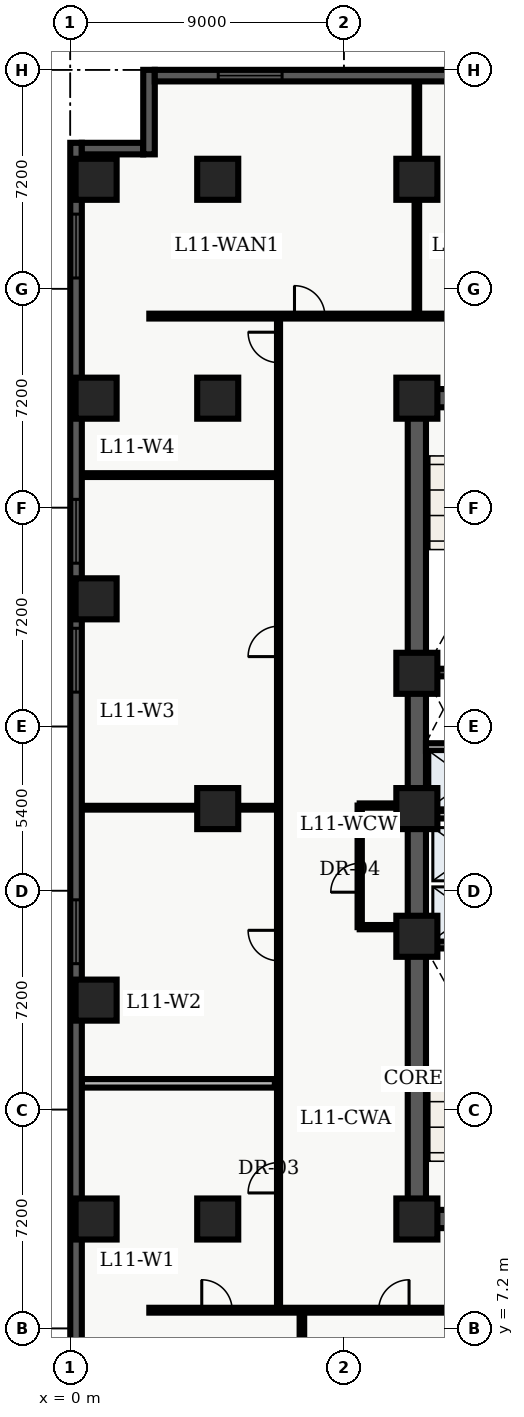
"""IFC4 building model, lengths in metres.
Left out: names, types, materials, properties, quantities, classifications, styles, units other than length and angle.
Written with IfcOpenShell. Run it as: python <this file> out.ifc"""

import sys

from ifc_helpers import new_model, entity, si_unit, converted_unit, direction, frame, origin_with_axes, origin_2d_with_axis, place, context, subcontext, project, spatial, polyline, rectangle, outline, extrude, element, fill, save


model = new_model("IFC4")
c1 = context("Model", 3, precision=1e-05, world=origin_with_axes(), true_north=direction((0.0, 1.0)))
c2 = subcontext(c1, "Body", "Model", "MODEL_VIEW")
j1 = project(units=[si_unit("LENGTHUNIT", "METRE"), converted_unit("PLANEANGLEUNIT", "DEGREE", entity("IfcPlaneAngleMeasure", 0.017), si_unit("PLANEANGLEUNIT", "RADIAN"), dimensions=[0, 0, 0, 0, 0, 0, 0])], contexts=[c1])
p1 = place(None, origin_with_axes())
s1 = spatial("IfcSite", under=j1, at=p1, CompositionType="ELEMENT")
p2 = place(p1, origin_with_axes())
s2 = spatial("IfcBuilding", under=s1, at=p2, CompositionType="ELEMENT")
p3 = place(p2, frame((0.0, 0.0, 48.3), z_axis=(0.0, 0.0, 1.0), x_axis=(1.0, 0.0, 0.0)))
s3 = spatial("IfcBuildingStorey", under=s2, at=p3, CompositionType="ELEMENT", Elevation=48.3)
p4 = place(p3, frame((11.4, 10.8, 0.0), z_axis=(0.0, 0.0, 1.0), x_axis=(0.0, 1.0, 0.0)))
e1 = element("IfcWall", 1, at=p4, inside=s3, PredefinedType="SHEAR", context=c2, shape_type="SweptSolid", body=[
    extrude(outline(polyline([(0.0, -0.3), (27.0, -0.3), (27.0, 0.3), (0.0, 0.3), (0.0, -0.3)])), origin_with_axes(), (0.0, 0.0, 1.0), 3.66),
])
p5 = place(p3, frame((11.4, 10.8, 0.0), z_axis=(0.0, 0.0, 1.0), x_axis=(1.0, 0.0, 0.0)))
e2 = element("IfcWall", 2, at=p5, inside=s3, PredefinedType="SHEAR", context=c2, shape_type="SweptSolid", body=[
    extrude(outline(polyline([(0.0, -0.3), (7.2, -0.3), (7.2, 0.3), (0.0, 0.3), (0.0, -0.3)])), origin_with_axes(), (0.0, 0.0, 1.0), 3.66),
])
p6 = place(p5, frame((2.625, 0.0, 0.0), z_axis=(0.0, 0.0, 1.0), x_axis=(1.0, 0.0, 0.0)))
e3 = element("IfcOpeningElement", 3, at=p6, cuts=e2, PredefinedType="OPENING", context=c2, shape_type="SweptSolid", body=[
    extrude(rectangle(XDim=1.05, YDim=0.62, at=origin_2d_with_axis()), origin_with_axes(), (0.0, 0.0, 1.0), 2.15),
])
p7 = place(p3, frame((11.4, 37.8, 0.0), z_axis=(0.0, 0.0, 1.0), x_axis=(1.0, 0.0, 0.0)))
e4 = element("IfcWall", 4, at=p7, inside=s3, PredefinedType="SHEAR", context=c2, shape_type="SweptSolid", body=[
    extrude(outline(polyline([(0.0, -0.3), (7.2, -0.3), (7.2, 0.3), (0.0, 0.3), (0.0, -0.3)])), origin_with_axes(), (0.0, 0.0, 1.0), 3.66),
])
p8 = place(p7, frame((2.625, 0.0, 0.0), z_axis=(0.0, 0.0, 1.0), x_axis=(1.0, 0.0, 0.0)))
e5 = element("IfcOpeningElement", 5, at=p8, cuts=e4, PredefinedType="OPENING", context=c2, shape_type="SweptSolid", body=[
    extrude(rectangle(XDim=1.05, YDim=0.62, at=origin_2d_with_axis()), origin_with_axes(), (0.0, 0.0, 1.0), 2.15),
])
for number, where, z_axis, x_axis in (
    (6, (11.7, 19.825, 0.0), (0.0, 0.0, 1.0), (1.0, 0.0, 0.0)),
    (7, (11.7, 28.775, 0.0), (0.0, 0.0, 1.0), (1.0, 0.0, 0.0)),
):
    element("IfcWall", number, at=place(p3, frame(where, z_axis=z_axis, x_axis=x_axis)), inside=s3, PredefinedType="SHEAR", context=c2, shape_type="SweptSolid", body=[
        extrude(outline(polyline([(0.0, -0.125), (6.6, -0.125), (6.6, 0.125), (0.0, 0.125), (0.0, -0.125)])), origin_with_axes(), (0.0, 0.0, 1.0), 3.66),
    ])
p9 = place(p3, frame((11.7, 24.1, 0.0), z_axis=(0.0, 0.0, 1.0), x_axis=(1.0, 0.0, 0.0)))
e8 = element("IfcWall", 8, at=p9, inside=s3, PredefinedType="SOLIDWALL", context=c2, shape_type="SweptSolid", body=[
    extrude(outline(polyline([(0.0, -0.125), (6.6, -0.125), (6.6, 0.125), (0.0, 0.125), (0.0, -0.125)])), origin_with_axes(), (0.0, 0.0, 1.0), 2.7),
])
p10 = place(p9, frame((3.6, 0.0, 0.0), z_axis=(0.0, 0.0, 1.0), x_axis=(1.0, 0.0, 0.0)))
e9 = element("IfcOpeningElement", 9, at=p10, cuts=e8, PredefinedType="OPENING", context=c2, shape_type="SweptSolid", body=[
    extrude(rectangle(XDim=0.9, YDim=0.27, at=origin_2d_with_axis()), origin_with_axes(), (0.0, 0.0, 1.0), 2.15),
])
p11 = place(p9, frame((5.65, 0.0, 0.0), z_axis=(0.0, 0.0, 1.0), x_axis=(1.0, 0.0, 0.0)))
e10 = element("IfcOpeningElement", 10, at=p11, cuts=e8, PredefinedType="OPENING", context=c2, shape_type="SweptSolid", body=[
    extrude(rectangle(XDim=0.9, YDim=0.27, at=origin_2d_with_axis()), origin_with_axes(), (0.0, 0.0, 1.0), 2.15),
])
p12 = place(p3, frame((11.7, 26.325, 0.0), z_axis=(0.0, 0.0, 1.0), x_axis=(1.0, 0.0, 0.0)))
e11 = element("IfcWall", 11, at=p12, inside=s3, PredefinedType="SOLIDWALL", context=c2, shape_type="SweptSolid", body=[
    extrude(outline(polyline([(0.0, -0.125), (6.6, -0.125), (6.6, 0.125), (0.0, 0.125), (0.0, -0.125)])), origin_with_axes(), (0.0, 0.0, 1.0), 2.7),
])
p13 = place(p12, frame((3.5, 0.0, 0.0), z_axis=(0.0, 0.0, 1.0), x_axis=(1.0, 0.0, 0.0)))
e12 = element("IfcOpeningElement", 12, at=p13, cuts=e11, PredefinedType="OPENING", context=c2, shape_type="SweptSolid", body=[
    extrude(rectangle(XDim=0.9, YDim=0.27, at=origin_2d_with_axis()), origin_with_axes(), (0.0, 0.0, 1.0), 2.15),
])
for number, where, z_axis, x_axis in (
    (13, (11.4, 10.8, 0.0), (0.0, 0.0, 1.0), (1.0, 0.0, 0.0)),
    (14, (11.4, 20.1, 0.0), (0.0, 0.0, 1.0), (1.0, 0.0, 0.0)),
    (15, (11.4, 24.3, 0.0), (0.0, 0.0, 1.0), (1.0, 0.0, 0.0)),
    (16, (11.4, 28.75, 0.0), (0.0, 0.0, 1.0), (1.0, 0.0, 0.0)),
    (17, (11.4, 37.8, 0.0), (0.0, 0.0, 1.0), (1.0, 0.0, 0.0)),
    (18, (11.4, 45.0, 0.0), (0.0, 0.0, 1.0), (1.0, 0.0, 0.0)),
    (19, (4.85, 10.8, 0.0), (0.0, 0.0, 1.0), (1.0, 0.0, 0.0)),
    (20, (4.85, 24.3, 0.0), (0.0, 0.0, 1.0), (1.0, 0.0, 0.0)),
    (21, (4.85, 37.8, 0.0), (0.0, 0.0, 1.0), (1.0, 0.0, 0.0)),
    (22, (4.85, 45.0, 0.0), (0.0, 0.0, 1.0), (1.0, 0.0, 0.0)),
    (23, (0.85, 10.8, 0.0), (0.0, 0.0, 1.0), (1.0, 0.0, 0.0)),
    (24, (0.85, 18.0, 0.0), (0.0, 0.0, 1.0), (1.0, 0.0, 0.0)),
    (25, (0.85, 31.2, 0.0), (0.0, 0.0, 1.0), (1.0, 0.0, 0.0)),
    (26, (0.85, 37.8, 0.0), (0.0, 0.0, 1.0), (1.0, 0.0, 0.0)),
    (27, (0.85, 45.0, 0.0), (0.0, 0.0, 1.0), (1.0, 0.0, 0.0)),
):
    element("IfcColumn", number, at=place(p3, frame(where, z_axis=z_axis, x_axis=x_axis)), inside=s3, PredefinedType="COLUMN", context=c2, shape_type="SweptSolid", body=[
        extrude(rectangle(XDim=1.35, YDim=1.35, at=origin_2d_with_axis()), origin_with_axes(), (0.0, 0.0, 1.0), 3.9),
    ])
p14 = place(p3, frame((9.52, 20.4, 0.0), z_axis=(0.0, 0.0, 1.0), x_axis=(0.0, 1.0, 0.0)))
e28 = element("IfcWall", 28, at=p14, inside=s3, PredefinedType="PARTITIONING", context=c2, shape_type="SweptSolid", body=[
    extrude(outline(polyline([(0.0, -0.07), (4.0, -0.07), (4.0, 0.07), (0.0, 0.07), (0.0, -0.07)])), origin_with_axes(), (0.0, 0.0, 1.0), 2.7),
])
p15 = place(p14, frame((1.625, 0.0, 0.0), z_axis=(0.0, 0.0, 1.0), x_axis=(1.0, 0.0, 0.0)))
e29 = element("IfcOpeningElement", 29, at=p15, cuts=e28, PredefinedType="OPENING", context=c2, shape_type="SweptSolid", body=[
    extrude(rectangle(XDim=0.95, YDim=0.16, at=origin_2d_with_axis()), origin_with_axes(), (0.0, 0.0, 1.0), 2.15),
])
for number, where, z_axis, x_axis in (
    (30, (9.52, 20.4, 0.0), (0.0, 0.0, 1.0), (1.0, 0.0, 0.0)),
    (31, (9.52, 24.4, 0.0), (0.0, 0.0, 1.0), (1.0, 0.0, 0.0)),
):
    element("IfcWall", number, at=place(p3, frame(where, z_axis=z_axis, x_axis=x_axis)), inside=s3, PredefinedType="PARTITIONING", context=c2, shape_type="SweptSolid", body=[
        extrude(outline(polyline([(0.0, -0.07), (1.58, -0.07), (1.58, 0.07), (0.0, 0.07), (0.0, -0.07)])), origin_with_axes(), (0.0, 0.0, 1.0), 2.7),
    ])
p16 = place(p3, frame((2.6, 7.8, 0.0), z_axis=(0.0, 0.0, 1.0), x_axis=(1.0, 0.0, 0.0)))
e32 = element("IfcWall", 32, at=p16, inside=s3, PredefinedType="PARTITIONING", context=c2, shape_type="SweptSolid", body=[
    extrude(outline(polyline([(0.0, -0.08), (18.55, -0.08), (18.55, 0.08), (0.0, 0.08), (0.0, -0.08)])), origin_with_axes(), (0.0, 0.0, 1.0), 2.7),
])
p17 = place(p16, frame((2.225, 0.0, 0.0), z_axis=(0.0, 0.0, 1.0), x_axis=(1.0, 0.0, 0.0)))
e33 = element("IfcOpeningElement", 33, at=p17, cuts=e32, PredefinedType="OPENING", context=c2, shape_type="SweptSolid", body=[
    extrude(rectangle(XDim=1.0, YDim=0.18, at=origin_2d_with_axis()), origin_with_axes(), (0.0, 0.0, 1.0), 2.15),
])
p18 = place(p16, frame((8.043, 0.0, 0.0), z_axis=(0.0, 0.0, 1.0), x_axis=(1.0, 0.0, 0.0)))
e34 = element("IfcOpeningElement", 34, at=p18, cuts=e32, PredefinedType="OPENING", context=c2, shape_type="SweptSolid", body=[
    extrude(rectangle(XDim=1.0, YDim=0.18, at=origin_2d_with_axis()), origin_with_axes(), (0.0, 0.0, 1.0), 2.15),
])
p19 = place(p16, frame((14.784, 0.0, 0.0), z_axis=(0.0, 0.0, 1.0), x_axis=(1.0, 0.0, 0.0)))
e35 = element("IfcOpeningElement", 35, at=p19, cuts=e32, PredefinedType="OPENING", context=c2, shape_type="SweptSolid", body=[
    extrude(rectangle(XDim=1.0, YDim=0.18, at=origin_2d_with_axis()), origin_with_axes(), (0.0, 0.0, 1.0), 2.15),
])
p20 = place(p3, frame((2.6, 40.5, 0.0), z_axis=(0.0, 0.0, 1.0), x_axis=(1.0, 0.0, 0.0)))
e36 = element("IfcWall", 36, at=p20, inside=s3, PredefinedType="PARTITIONING", context=c2, shape_type="SweptSolid", body=[
    extrude(outline(polyline([(0.0, -0.08), (18.65, -0.08), (18.65, 0.08), (0.0, 0.08), (0.0, -0.08)])), origin_with_axes(), (0.0, 0.0, 1.0), 2.7),
])
p21 = place(p20, frame((5.275, 0.0, 0.0), z_axis=(0.0, 0.0, 1.0), x_axis=(1.0, 0.0, 0.0)))
e37 = element("IfcOpeningElement", 37, at=p21, cuts=e36, PredefinedType="OPENING", context=c2, shape_type="SweptSolid", body=[
    extrude(rectangle(XDim=1.0, YDim=0.18, at=origin_2d_with_axis()), origin_with_axes(), (0.0, 0.0, 1.0), 2.15),
])
p22 = place(p20, frame((12.61, 0.0, 0.0), z_axis=(0.0, 0.0, 1.0), x_axis=(1.0, 0.0, 0.0)))
e38 = element("IfcOpeningElement", 38, at=p22, cuts=e36, PredefinedType="OPENING", context=c2, shape_type="SweptSolid", body=[
    extrude(rectangle(XDim=1.2, YDim=0.18, at=origin_2d_with_axis()), origin_with_axes(), (0.0, 0.0, 1.0), 2.2),
])
p23 = place(p3, frame((6.85, 7.8, 0.0), z_axis=(0.0, 0.0, 1.0), x_axis=(0.0, 1.0, 0.0)))
e39 = element("IfcWall", 39, at=p23, inside=s3, PredefinedType="PARTITIONING", context=c2, shape_type="SweptSolid", body=[
    extrude(outline(polyline([(0.0, -0.05), (32.7, -0.05), (32.7, 0.05), (0.0, 0.05), (0.0, -0.05)])), origin_with_axes(), (0.0, 0.0, 1.0), 2.7),
])
p24 = place(p23, frame((4.357, 0.0, 0.0), z_axis=(0.0, 0.0, 1.0), x_axis=(1.0, 0.0, 0.0)))
e40 = element("IfcOpeningElement", 40, at=p24, cuts=e39, PredefinedType="OPENING", context=c2, shape_type="SweptSolid", body=[
    extrude(rectangle(XDim=1.0, YDim=0.12, at=origin_2d_with_axis()), origin_with_axes(), (0.0, 0.0, 1.0), 2.15),
])
p25 = place(p23, frame((11.996, 0.0, 0.0), z_axis=(0.0, 0.0, 1.0), x_axis=(1.0, 0.0, 0.0)))
e41 = element("IfcOpeningElement", 41, at=p25, cuts=e39, PredefinedType="OPENING", context=c2, shape_type="SweptSolid", body=[
    extrude(rectangle(XDim=1.0, YDim=0.12, at=origin_2d_with_axis()), origin_with_axes(), (0.0, 0.0, 1.0), 2.15),
])
p26 = place(p23, frame((22.0, 0.0, 0.0), z_axis=(0.0, 0.0, 1.0), x_axis=(1.0, 0.0, 0.0)))
e42 = element("IfcOpeningElement", 42, at=p26, cuts=e39, PredefinedType="OPENING", context=c2, shape_type="SweptSolid", body=[
    extrude(rectangle(XDim=1.0, YDim=0.12, at=origin_2d_with_axis()), origin_with_axes(), (0.0, 0.0, 1.0), 2.15),
])
p27 = place(p23, frame((31.67, 0.0, 0.0), z_axis=(0.0, 0.0, 1.0), x_axis=(1.0, 0.0, 0.0)))
e43 = element("IfcOpeningElement", 43, at=p27, cuts=e39, PredefinedType="OPENING", context=c2, shape_type="SweptSolid", body=[
    extrude(rectangle(XDim=1.0, YDim=0.12, at=origin_2d_with_axis()), origin_with_axes(), (0.0, 0.0, 1.0), 2.15),
])
p28 = place(p3, frame((0.375, 15.263, 0.0), z_axis=(0.0, 0.0, 1.0), x_axis=(1.0, 0.0, 0.0)))
e44 = element("IfcWall", 44, at=p28, inside=s3, PredefinedType="PARTITIONING", context=c2, shape_type="SweptSolid", body=[
    extrude(outline(polyline([(0.0, -0.14), (6.355, -0.14), (6.355, 0.14), (0.0, 0.14), (0.0, -0.14)])), origin_with_axes(), (0.0, 0.0, 1.0), 2.7),
])
for number, where, z_axis, x_axis in (
    (45, (0.375, 24.329, 0.0), (0.0, 0.0, 1.0), (1.0, 0.0, 0.0)),
    (46, (0.375, 35.27, 0.0), (0.0, 0.0, 1.0), (1.0, 0.0, 0.0)),
):
    element("IfcWall", number, at=place(p3, frame(where, z_axis=z_axis, x_axis=x_axis)), inside=s3, PredefinedType="PARTITIONING", context=c2, shape_type="SweptSolid", body=[
        extrude(outline(polyline([(0.0, -0.062), (6.355, -0.062), (6.355, 0.062), (0.0, 0.062), (0.0, -0.062)])), origin_with_axes(), (0.0, 0.0, 1.0), 2.7),
    ])
p29 = place(p3, frame((7.619, 0.36, 0.0), z_axis=(0.0, 0.0, 1.0), x_axis=(0.0, 1.0, 0.0)))
e47 = element("IfcWall", 47, at=p29, inside=s3, PredefinedType="PARTITIONING", context=c2, shape_type="SweptSolid", body=[
    extrude(outline(polyline([(0.0, -0.075), (7.34, -0.075), (7.34, 0.075), (0.0, 0.075), (0.0, -0.075)])), origin_with_axes(), (0.0, 0.0, 1.0), 2.7),
])
p30 = place(p3, frame((11.4, 40.6, 0.0), z_axis=(0.0, 0.0, 1.0), x_axis=(0.0, 1.0, 0.0)))
e48 = element("IfcWall", 48, at=p30, inside=s3, PredefinedType="PARTITIONING", context=c2, shape_type="SweptSolid", body=[
    extrude(outline(polyline([(0.0, -0.075), (7.64, -0.075), (7.64, 0.075), (0.0, 0.075), (0.0, -0.075)])), origin_with_axes(), (0.0, 0.0, 1.0), 2.7),
])
p31 = place(p3, frame((0.19, 2.78, 0.0), z_axis=(0.0, 0.0, 1.0), x_axis=(0.0, 1.0, 0.0)))
e49 = element("IfcWall", 49, at=p31, inside=s3, PredefinedType="SOLIDWALL", context=c2, shape_type="SweptSolid", body=[
    extrude(outline(polyline([(0.0, -0.19), (43.42, -0.19), (43.42, 0.19), (0.0, 0.19), (0.0, -0.19)])), origin_with_axes(), (0.0, 0.0, 1.0), 3.66),
])
p32 = place(p31, frame((2.946, 0.0, 0.45), z_axis=(0.0, 0.0, 1.0), x_axis=(1.0, 0.0, 0.0)))
e50 = element("IfcOpeningElement", 50, at=p32, cuts=e49, PredefinedType="OPENING", context=c2, shape_type="SweptSolid", body=[
    extrude(rectangle(XDim=2.1, YDim=0.4, at=origin_2d_with_axis()), origin_with_axes(), (0.0, 0.0, 1.0), 2.2),
])
p33 = place(p31, frame((17.469, 0.0, 0.45), z_axis=(0.0, 0.0, 1.0), x_axis=(1.0, 0.0, 0.0)))
e51 = element("IfcOpeningElement", 51, at=p33, cuts=e49, PredefinedType="OPENING", context=c2, shape_type="SweptSolid", body=[
    extrude(rectangle(XDim=2.1, YDim=0.4, at=origin_2d_with_axis()), origin_with_axes(), (0.0, 0.0, 1.0), 2.2),
])
p34 = place(p31, frame((26.401, 0.0, 0.45), z_axis=(0.0, 0.0, 1.0), x_axis=(1.0, 0.0, 0.0)))
e52 = element("IfcOpeningElement", 52, at=p34, cuts=e49, PredefinedType="OPENING", context=c2, shape_type="SweptSolid", body=[
    extrude(rectangle(XDim=2.1, YDim=0.4, at=origin_2d_with_axis()), origin_with_axes(), (0.0, 0.0, 1.0), 2.2),
])
p35 = place(p31, frame((30.642, 0.0, 0.45), z_axis=(0.0, 0.0, 1.0), x_axis=(1.0, 0.0, 0.0)))
e53 = element("IfcOpeningElement", 53, at=p35, cuts=e49, PredefinedType="OPENING", context=c2, shape_type="SweptSolid", body=[
    extrude(rectangle(XDim=2.1, YDim=0.4, at=origin_2d_with_axis()), origin_with_axes(), (0.0, 0.0, 1.0), 2.2),
])
p36 = place(p31, frame((40.024, 0.0, 0.45), z_axis=(0.0, 0.0, 1.0), x_axis=(1.0, 0.0, 0.0)))
e54 = element("IfcOpeningElement", 54, at=p36, cuts=e49, PredefinedType="OPENING", context=c2, shape_type="SweptSolid", body=[
    extrude(rectangle(XDim=2.1, YDim=0.4, at=origin_2d_with_axis()), origin_with_axes(), (0.0, 0.0, 1.0), 2.2),
])
p37 = place(p3, frame((0.38, 46.01, 0.0), z_axis=(0.0, 0.0, 1.0), x_axis=(1.0, 0.0, 0.0)))
e55 = element("IfcWall", 55, at=p37, inside=s3, PredefinedType="SOLIDWALL", context=c2, shape_type="SweptSolid", body=[
    extrude(outline(polyline([(0.0, -0.19), (2.02, -0.19), (2.02, 0.19), (0.0, 0.19), (0.0, -0.19)])), origin_with_axes(), (0.0, 0.0, 1.0), 3.66),
])
p38 = place(p3, frame((2.59, 45.82, 0.0), z_axis=(0.0, 0.0, 1.0), x_axis=(0.0, 1.0, 0.0)))
e56 = element("IfcWall", 56, at=p38, inside=s3, PredefinedType="SOLIDWALL", context=c2, shape_type="SweptSolid", body=[
    extrude(outline(polyline([(0.0, -0.19), (2.78, -0.19), (2.78, 0.19), (0.0, 0.19), (0.0, -0.19)])), origin_with_axes(), (0.0, 0.0, 1.0), 3.66),
])
p39 = place(p3, frame((2.78, 48.41, 0.0), z_axis=(0.0, 0.0, 1.0), x_axis=(1.0, 0.0, 0.0)))
e57 = element("IfcWall", 57, at=p39, inside=s3, PredefinedType="SOLIDWALL", context=c2, shape_type="SweptSolid", body=[
    extrude(outline(polyline([(0.0, -0.19), (16.42, -0.19), (16.42, 0.19), (0.0, 0.19), (0.0, -0.19)])), origin_with_axes(), (0.0, 0.0, 1.0), 3.66),
])
p40 = place(p39, frame((3.137, 0.0, 0.45), z_axis=(0.0, 0.0, 1.0), x_axis=(1.0, 0.0, 0.0)))
e58 = element("IfcOpeningElement", 58, at=p40, cuts=e57, PredefinedType="OPENING", context=c2, shape_type="SweptSolid", body=[
    extrude(rectangle(XDim=2.1, YDim=0.4, at=origin_2d_with_axis()), origin_with_axes(), (0.0, 0.0, 1.0), 2.2),
])
p41 = place(p39, frame((13.283, 0.0, 0.45), z_axis=(0.0, 0.0, 1.0), x_axis=(1.0, 0.0, 0.0)))
e59 = element("IfcOpeningElement", 59, at=p41, cuts=e57, PredefinedType="OPENING", context=c2, shape_type="SweptSolid", body=[
    extrude(rectangle(XDim=2.1, YDim=0.4, at=origin_2d_with_axis()), origin_with_axes(), (0.0, 0.0, 1.0), 2.2),
])
p42 = place(p14, frame((1.625, 0.0, 0.0), z_axis=(0.0, 0.0, 1.0), x_axis=(1.0, 0.0, 0.0)))
e60 = element("IfcDoor", 60, at=p42, inside=s3, OperationType="SINGLE_SWING_LEFT", PredefinedType="DOOR", context=c2, shape_type="SweptSolid", body=[
    extrude(rectangle(XDim=0.95, YDim=0.084, at=origin_2d_with_axis()), origin_with_axes(), (0.0, 0.0, 1.0), 2.15),
])
fill(e29, e60)
p43 = place(p23, frame((4.357, 0.0, 0.0), z_axis=(0.0, 0.0, 1.0), x_axis=(1.0, 0.0, 0.0)))
e61 = element("IfcDoor", 61, at=p43, inside=s3, OperationType="SINGLE_SWING_LEFT", PredefinedType="DOOR", context=c2, shape_type="SweptSolid", body=[
    extrude(rectangle(XDim=1.0, YDim=0.06, at=origin_2d_with_axis()), origin_with_axes(), (0.0, 0.0, 1.0), 2.15),
])
fill(e40, e61)
p44 = place(p23, frame((11.996, 0.0, 0.0), z_axis=(0.0, 0.0, 1.0), x_axis=(1.0, 0.0, 0.0)))
e62 = element("IfcDoor", 62, at=p44, inside=s3, OperationType="SINGLE_SWING_RIGHT", PredefinedType="DOOR", context=c2, shape_type="SweptSolid", body=[
    extrude(rectangle(XDim=1.0, YDim=0.06, at=origin_2d_with_axis()), origin_with_axes(), (0.0, 0.0, 1.0), 2.15),
])
fill(e41, e62)
p45 = place(p23, frame((22.0, 0.0, 0.0), z_axis=(0.0, 0.0, 1.0), x_axis=(1.0, 0.0, 0.0)))
e63 = element("IfcDoor", 63, at=p45, inside=s3, OperationType="SINGLE_SWING_LEFT", PredefinedType="DOOR", context=c2, shape_type="SweptSolid", body=[
    extrude(rectangle(XDim=1.0, YDim=0.06, at=origin_2d_with_axis()), origin_with_axes(), (0.0, 0.0, 1.0), 2.15),
])
fill(e42, e63)
p46 = place(p23, frame((31.67, 0.0, 0.0), z_axis=(0.0, 0.0, 1.0), x_axis=(1.0, 0.0, 0.0)))
e64 = element("IfcDoor", 64, at=p46, inside=s3, OperationType="SINGLE_SWING_RIGHT", PredefinedType="DOOR", context=c2, shape_type="SweptSolid", body=[
    extrude(rectangle(XDim=1.0, YDim=0.06, at=origin_2d_with_axis()), origin_with_axes(), (0.0, 0.0, 1.0), 2.15),
])
fill(e43, e64)
p47 = place(p16, frame((2.225, 0.0, 0.0), z_axis=(0.0, 0.0, 1.0), x_axis=(1.0, 0.0, 0.0)))
e65 = element("IfcDoor", 65, at=p47, inside=s3, OperationType="SINGLE_SWING_LEFT", PredefinedType="DOOR", context=c2, shape_type="SweptSolid", body=[
    extrude(rectangle(XDim=1.0, YDim=0.09, at=origin_2d_with_axis()), origin_with_axes(), (0.0, 0.0, 1.0), 2.15),
])
fill(e33, e65)
p48 = place(p16, frame((8.043, 0.0, 0.0), z_axis=(0.0, 0.0, 1.0), x_axis=(1.0, 0.0, 0.0)))
e66 = element("IfcDoor", 66, at=p48, inside=s3, OperationType="SINGLE_SWING_RIGHT", PredefinedType="DOOR", context=c2, shape_type="SweptSolid", body=[
    extrude(rectangle(XDim=1.0, YDim=0.09, at=origin_2d_with_axis()), origin_with_axes(), (0.0, 0.0, 1.0), 2.15),
])
fill(e34, e66)
p49 = place(p20, frame((5.275, 0.0, 0.0), z_axis=(0.0, 0.0, 1.0), x_axis=(1.0, 0.0, 0.0)))
e67 = element("IfcDoor", 67, at=p49, inside=s3, OperationType="SINGLE_SWING_LEFT", PredefinedType="DOOR", context=c2, shape_type="SweptSolid", body=[
    extrude(rectangle(XDim=1.0, YDim=0.09, at=origin_2d_with_axis()), origin_with_axes(), (0.0, 0.0, 1.0), 2.15),
])
fill(e37, e67)
p50 = place(p31, frame((17.469, 0.0, 0.45), z_axis=(0.0, 0.0, 1.0), x_axis=(1.0, 0.0, 0.0)))
e68 = element("IfcWindow", 68, at=p50, inside=s3, PredefinedType="WINDOW", context=c2, shape_type="SweptSolid", body=[
    extrude(rectangle(XDim=2.1, YDim=0.09, at=origin_2d_with_axis()), origin_with_axes(), (0.0, 0.0, 1.0), 2.2),
])
fill(e51, e68)
p51 = place(p31, frame((26.401, 0.0, 0.45), z_axis=(0.0, 0.0, 1.0), x_axis=(1.0, 0.0, 0.0)))
e69 = element("IfcWindow", 69, at=p51, inside=s3, PredefinedType="WINDOW", context=c2, shape_type="SweptSolid", body=[
    extrude(rectangle(XDim=2.1, YDim=0.09, at=origin_2d_with_axis()), origin_with_axes(), (0.0, 0.0, 1.0), 2.2),
])
fill(e52, e69)
p52 = place(p31, frame((30.642, 0.0, 0.45), z_axis=(0.0, 0.0, 1.0), x_axis=(1.0, 0.0, 0.0)))
e70 = element("IfcWindow", 70, at=p52, inside=s3, PredefinedType="WINDOW", context=c2, shape_type="SweptSolid", body=[
    extrude(rectangle(XDim=2.1, YDim=0.09, at=origin_2d_with_axis()), origin_with_axes(), (0.0, 0.0, 1.0), 2.2),
])
fill(e53, e70)
p53 = place(p31, frame((40.024, 0.0, 0.45), z_axis=(0.0, 0.0, 1.0), x_axis=(1.0, 0.0, 0.0)))
e71 = element("IfcWindow", 71, at=p53, inside=s3, PredefinedType="WINDOW", context=c2, shape_type="SweptSolid", body=[
    extrude(rectangle(XDim=2.1, YDim=0.09, at=origin_2d_with_axis()), origin_with_axes(), (0.0, 0.0, 1.0), 2.2),
])
fill(e54, e71)
p54 = place(p39, frame((3.137, 0.0, 0.45), z_axis=(0.0, 0.0, 1.0), x_axis=(1.0, 0.0, 0.0)))
e72 = element("IfcWindow", 72, at=p54, inside=s3, PredefinedType="WINDOW", context=c2, shape_type="SweptSolid", body=[
    extrude(rectangle(XDim=2.1, YDim=0.09, at=origin_2d_with_axis()), origin_with_axes(), (0.0, 0.0, 1.0), 2.2),
])
fill(e58, e72)
save(model, sys.argv[1])
